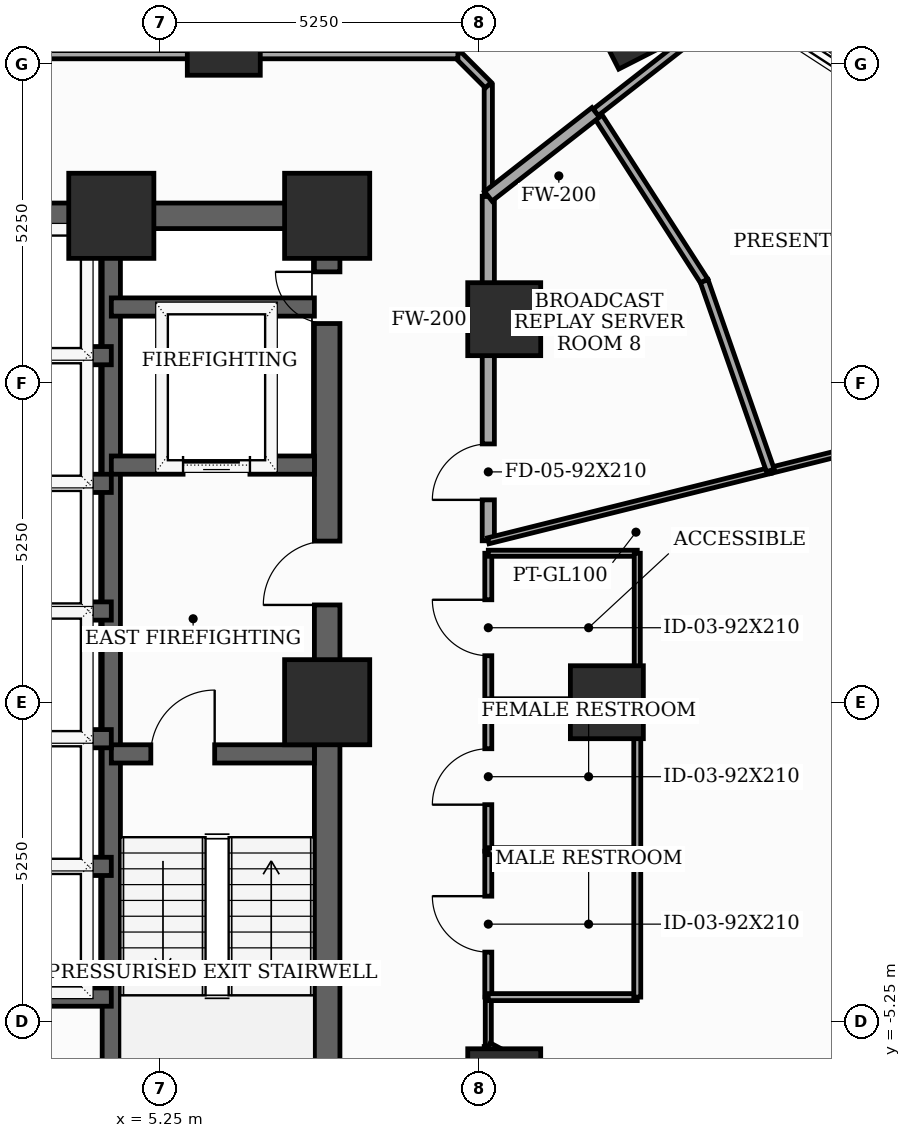
"""IFC4 building model, lengths in metres.
Left out: names, types, materials, properties, quantities, classifications, styles, units other than length and angle.
Written with IfcOpenShell. Run it as: python <this file> out.ifc"""

import sys

from ifc_helpers import new_model, si_unit, direction, frame, frame_2d, origin, origin_2d, place, context, subcontext, project, spatial, rectangle, extrude, element, fill, save


model = new_model("IFC4")
c1 = context("Model", 3, precision=1e-05, world=origin(), true_north=direction((0.0, 1.0)))
c2 = subcontext(c1, "Body", "Model", "MODEL_VIEW")
j1 = project(units=[si_unit("LENGTHUNIT", "METRE"), si_unit("PLANEANGLEUNIT", "RADIAN")], contexts=[c1])
p1 = place(None, origin())
s1 = spatial("IfcSite", under=j1, at=p1, CompositionType="ELEMENT")
p2 = place(p1, origin())
s2 = spatial("IfcBuilding", under=s1, at=p2, CompositionType="ELEMENT")
p3 = place(p2, frame((0.0, 0.0, 127.3)))
s3 = spatial("IfcBuildingStorey", under=s2, at=p3, CompositionType="ELEMENT", Elevation=127.3)
for number, where, z_axis, x_axis in (
    (1, (8.0, 0.0, 0.0), (0.0, 0.0, 1.0), (1.0, 0.0, 0.0)),
    (2, (8.0, 8.0, 0.0), (0.0, 0.0, 1.0), (1.0, 0.0, 0.0)),
    (3, (4.45, 8.0, 0.0), (0.0, 0.0, 1.0), (1.0, 0.0, 0.0)),
):
    element("IfcColumn", number, at=place(p3, frame(where, z_axis=z_axis, x_axis=x_axis)), inside=s3, PredefinedType="COLUMN", context=c2, shape_type="SweptSolid", body=[
        extrude(rectangle(XDim=1.4, YDim=1.4, at=origin_2d()), origin(), (0.0, 0.0, 1.0), 3.7),
    ])
for number, where, z_axis, x_axis in (
    (4, (12.6, 0.0, 0.0), (0.0, 0.0, 1.0), (1.0, 0.0, 0.0)),
    (5, (10.912, 6.3, 0.0), (0.0, 0.0, 1.0), (1.0, 0.0, 0.0)),
    (6, (6.3, 10.912, 0.0), (0.0, 0.0, 1.0), (1.0, 0.0, 0.0)),
    (7, (10.912, -6.3, 0.0), (0.0, 0.0, 1.0), (1.0, 0.0, 0.0)),
    (8, (13.058, 11.22, 0.0), (0.0, 0.0, 1.0), (0.891, 0.454, 0.0)),
):
    element("IfcColumn", number, at=place(p3, frame(where, z_axis=z_axis, x_axis=x_axis)), inside=s3, PredefinedType="COLUMN", context=c2, shape_type="SweptSolid", body=[
        extrude(rectangle(XDim=1.2, YDim=1.2, at=origin_2d()), origin(), (0.0, 0.0, 1.0), 3.7),
    ])
p4 = place(p3, frame((8.0, -8.0, 0.0), z_axis=(0.0, 0.0, 1.0), x_axis=(0.0, 1.0, 0.0)))
e9 = element("IfcWall", 9, at=p4, inside=s3, PredefinedType="SHEAR", context=c2, shape_type="SweptSolid", body=[
    extrude(rectangle(XDim=16.0, YDim=0.42, at=frame_2d((8.0, 0.0))), origin(), (0.0, 0.0, 1.0), 3.5),
])
p5 = place(p4, frame((9.6, 0.0, 0.0)))
e10 = element("IfcOpeningElement", 10, at=p5, cuts=e9, PredefinedType="OPENING", context=c2, shape_type="SweptSolid", body=[
    extrude(rectangle(XDim=1.05, YDim=2.15, at=frame_2d((0.525, 1.075))), frame((0.0, 0.22, 0.0), z_axis=(0.0, -1.0, 0.0), x_axis=(1.0, 0.0, 0.0)), (0.0, 0.0, 1.0), 0.44),
])
p6 = place(p4, frame((14.229, 0.0, 0.0)))
e11 = element("IfcOpeningElement", 11, at=p6, cuts=e9, PredefinedType="OPENING", context=c2, shape_type="SweptSolid", body=[
    extrude(rectangle(XDim=0.85, YDim=2.02, at=frame_2d((0.425, 1.01))), frame((0.0, 0.22, 0.0), z_axis=(0.0, -1.0, 0.0), x_axis=(1.0, 0.0, 0.0)), (0.0, 0.0, 1.0), 0.44),
])
p7 = place(p3, frame((-8.0, 8.0, 0.0), z_axis=(0.0, 0.0, 1.0), x_axis=(1.0, 0.0, 0.0)))
e12 = element("IfcWall", 12, at=p7, inside=s3, PredefinedType="SHEAR", context=c2, shape_type="SweptSolid", body=[
    extrude(rectangle(XDim=16.0, YDim=0.42, at=frame_2d((8.0, 0.0))), origin(), (0.0, 0.0, 1.0), 3.5),
])
p8 = place(p7, frame((7.1, 0.0, 0.0)))
e13 = element("IfcOpeningElement", 13, at=p8, cuts=e12, PredefinedType="OPENING", context=c2, shape_type="SweptSolid", body=[
    extrude(rectangle(XDim=1.8, YDim=2.15, at=frame_2d((0.9, 1.075))), frame((0.0, 0.22, 0.0), z_axis=(0.0, -1.0, 0.0), x_axis=(1.0, 0.0, 0.0)), (0.0, 0.0, 1.0), 0.44),
])
p9 = place(p3, frame((4.45, -7.79, 0.0), z_axis=(0.0, 0.0, 1.0), x_axis=(0.0, 1.0, 0.0)))
e14 = element("IfcWall", 14, at=p9, inside=s3, PredefinedType="SHEAR", context=c2, shape_type="SweptSolid", body=[
    extrude(rectangle(XDim=15.58, YDim=0.3, at=frame_2d((7.79, 0.0))), origin(), (0.0, 0.0, 1.0), 3.5),
])
p10 = place(p3, frame((4.45, -0.85, 0.0), z_axis=(0.0, 0.0, 1.0), x_axis=(1.0, 0.0, 0.0)))
e15 = element("IfcWall", 15, at=p10, inside=s3, PredefinedType="SHEAR", context=c2, shape_type="SweptSolid", body=[
    extrude(rectangle(XDim=3.34, YDim=0.3, at=frame_2d((1.67, 0.0))), origin(), (0.0, 0.0, 1.0), 3.5),
])
p11 = place(p10, frame((0.65, 0.0, 0.0)))
e16 = element("IfcOpeningElement", 16, at=p11, cuts=e15, PredefinedType="OPENING", context=c2, shape_type="SweptSolid", body=[
    extrude(rectangle(XDim=1.05, YDim=2.15, at=frame_2d((0.525, 1.075))), frame((0.0, 0.16, 0.0), z_axis=(0.0, -1.0, 0.0), x_axis=(1.0, 0.0, 0.0)), (0.0, 0.0, 1.0), 0.32),
])
p12 = place(p3, frame((4.45, 3.9, 0.0), z_axis=(0.0, 0.0, 1.0), x_axis=(1.0, 0.0, 0.0)))
e17 = element("IfcWall", 17, at=p12, inside=s3, PredefinedType="SHEAR", context=c2, shape_type="SweptSolid", body=[
    extrude(rectangle(XDim=3.34, YDim=0.3, at=frame_2d((1.67, 0.0))), origin(), (0.0, 0.0, 1.0), 3.5),
])
p13 = place(p12, frame((1.18, 0.0, 0.0)))
e18 = element("IfcOpeningElement", 18, at=p13, cuts=e17, PredefinedType="OPENING", context=c2, shape_type="SweptSolid", body=[
    extrude(rectangle(XDim=1.1, YDim=2.1, at=frame_2d((0.55, 1.05))), frame((0.0, 0.16, 0.0), z_axis=(0.0, -1.0, 0.0), x_axis=(1.0, 0.0, 0.0)), (0.0, 0.0, 1.0), 0.32),
])
p14 = place(p3, frame((4.45, 6.5, 0.0), z_axis=(0.0, 0.0, 1.0), x_axis=(1.0, 0.0, 0.0)))
e19 = element("IfcWall", 19, at=p14, inside=s3, PredefinedType="SHEAR", context=c2, shape_type="SweptSolid", body=[
    extrude(rectangle(XDim=3.34, YDim=0.3, at=frame_2d((1.67, 0.0))), origin(), (0.0, 0.0, 1.0), 3.5),
])
p15 = place(p3, frame((-4.45, -4.85, 0.0), z_axis=(0.0, 0.0, 1.0), x_axis=(1.0, 0.0, 0.0)))
e20 = element("IfcWall", 20, at=p15, inside=s3, PredefinedType="SHEAR", context=c2, shape_type="SweptSolid", body=[
    extrude(rectangle(XDim=8.9, YDim=0.3, at=frame_2d((4.45, 0.0))), origin(), (0.0, 0.0, 1.0), 3.5),
])
for number, where, z_axis, x_axis in (
    (21, (1.68, 1.5, 0.0), (0.0, 0.0, 1.0), (1.0, 0.0, 0.0)),
    (22, (1.68, 3.6, 0.0), (0.0, 0.0, 1.0), (1.0, 0.0, 0.0)),
    (23, (1.68, 5.7, 0.0), (0.0, 0.0, 1.0), (1.0, 0.0, 0.0)),
    (24, (1.68, -2.7, 0.0), (0.0, 0.0, 1.0), (1.0, 0.0, 0.0)),
    (25, (1.68, -0.6, 0.0), (0.0, 0.0, 1.0), (1.0, 0.0, 0.0)),
):
    element("IfcWall", number, at=place(p3, frame(where, z_axis=z_axis, x_axis=x_axis)), inside=s3, PredefinedType="SHEAR", context=c2, shape_type="SweptSolid", body=[
        extrude(rectangle(XDim=2.77, YDim=0.3, at=frame_2d((1.385, 0.0))), origin(), (0.0, 0.0, 1.0), 3.5),
    ])
p16 = place(p3, frame((10.65, -10.15, 0.0), z_axis=(0.0, 0.0, 1.0), x_axis=(0.0, 1.0, 0.0)))
e26 = element("IfcWall", 26, at=p16, inside=s3, PredefinedType="PARTITIONING", context=c2, shape_type="SweptSolid", body=[
    extrude(rectangle(XDim=4.487, YDim=0.135, at=frame_2d((2.243, 0.0))), origin(), (0.0, 0.0, 1.0), 2.785),
])
p17 = place(p16, frame((0.781, 0.0, 0.0)))
e27 = element("IfcOpeningElement", 27, at=p17, cuts=e26, PredefinedType="OPENING", context=c2, shape_type="SweptSolid", body=[
    extrude(rectangle(XDim=0.95, YDim=2.1, at=frame_2d((0.475, 1.05))), frame((0.0, 0.077, 0.0), z_axis=(0.0, -1.0, 0.0), x_axis=(1.0, 0.0, 0.0)), (0.0, 0.0, 1.0), 0.155),
])
p18 = place(p3, frame((10.65, -4.85, 0.0), z_axis=(0.0, 0.0, 1.0), x_axis=(0.0, 1.0, 0.0)))
e28 = element("IfcWall", 28, at=p18, inside=s3, PredefinedType="PARTITIONING", context=c2, shape_type="SweptSolid", body=[
    extrude(rectangle(XDim=2.4, YDim=0.115, at=frame_2d((1.2, 0.0))), origin(), (0.0, 0.0, 1.0), 3.5),
])
p19 = place(p18, frame((0.74, 0.0, 0.0)))
e29 = element("IfcOpeningElement", 29, at=p19, cuts=e28, PredefinedType="OPENING", context=c2, shape_type="SweptSolid", body=[
    extrude(rectangle(XDim=0.92, YDim=2.1, at=frame_2d((0.46, 1.05))), frame((0.0, 0.067, 0.0), z_axis=(0.0, -1.0, 0.0), x_axis=(1.0, 0.0, 0.0)), (0.0, 0.0, 1.0), 0.135),
])
p20 = place(p3, frame((10.65, -2.45, 0.0), z_axis=(0.0, 0.0, 1.0), x_axis=(0.0, 1.0, 0.0)))
e30 = element("IfcWall", 30, at=p20, inside=s3, PredefinedType="PARTITIONING", context=c2, shape_type="SweptSolid", body=[
    extrude(rectangle(XDim=2.45, YDim=0.115, at=frame_2d((1.225, 0.0))), origin(), (0.0, 0.0, 1.0), 2.785),
])
p21 = place(p20, frame((0.765, 0.0, 0.0)))
e31 = element("IfcOpeningElement", 31, at=p21, cuts=e30, PredefinedType="OPENING", context=c2, shape_type="SweptSolid", body=[
    extrude(rectangle(XDim=0.92, YDim=2.1, at=frame_2d((0.46, 1.05))), frame((0.0, 0.067, 0.0), z_axis=(0.0, -1.0, 0.0), x_axis=(1.0, 0.0, 0.0)), (0.0, 0.0, 1.0), 0.135),
])
p22 = place(p3, frame((10.65, -5.663, 0.0), z_axis=(0.0, 0.0, 1.0), x_axis=(0.0, 1.0, 0.0)))
e32 = element("IfcWall", 32, at=p22, inside=s3, PredefinedType="MOVABLE", context=c2, shape_type="SweptSolid", body=[
    extrude(rectangle(XDim=0.813, YDim=0.1, at=frame_2d((0.406, 0.0))), origin(), (0.0, 0.0, 1.0), 3.5),
])
p23 = place(p3, frame((10.65, 0.0, 0.0), z_axis=(0.0, 0.0, 1.0), x_axis=(0.0, 1.0, 0.0)))
e33 = element("IfcWall", 33, at=p23, inside=s3, PredefinedType="PARTITIONING", context=c2, shape_type="SweptSolid", body=[
    extrude(rectangle(XDim=2.45, YDim=0.115, at=frame_2d((1.225, 0.0))), origin(), (0.0, 0.0, 1.0), 2.785),
])
p24 = place(p23, frame((0.765, 0.0, 0.0)))
e34 = element("IfcOpeningElement", 34, at=p24, cuts=e33, PredefinedType="OPENING", context=c2, shape_type="SweptSolid", body=[
    extrude(rectangle(XDim=0.92, YDim=2.1, at=frame_2d((0.46, 1.05))), frame((0.0, 0.067, 0.0), z_axis=(0.0, -1.0, 0.0), x_axis=(1.0, 0.0, 0.0)), (0.0, 0.0, 1.0), 0.135),
])
p25 = place(p3, frame((10.65, 2.655, 0.0), z_axis=(0.0, 0.0, 1.0), x_axis=(0.0, 1.0, 0.0)))
e35 = element("IfcWall", 35, at=p25, inside=s3, PredefinedType="SOLIDWALL", context=c2, shape_type="SweptSolid", body=[
    extrude(rectangle(XDim=5.666, YDim=0.2, at=frame_2d((2.833, 0.0))), origin(), (0.0, 0.0, 1.0), 2.785),
])
p26 = place(p25, frame((0.673, 0.0, 0.0)))
e36 = element("IfcOpeningElement", 36, at=p26, cuts=e35, PredefinedType="OPENING", context=c2, shape_type="SweptSolid", body=[
    extrude(rectangle(XDim=0.92, YDim=2.1, at=frame_2d((0.46, 1.05))), frame((0.0, 0.11, 0.0), z_axis=(0.0, -1.0, 0.0), x_axis=(1.0, 0.0, 0.0)), (0.0, 0.0, 1.0), 0.22),
])
p27 = place(p3, frame((10.65, 8.321, 0.0), z_axis=(0.0, 0.0, 1.0), x_axis=(0.0, 1.0, 0.0)))
e37 = element("IfcWall", 37, at=p27, inside=s3, PredefinedType="PARTITIONING", context=c2, shape_type="SweptSolid", body=[
    extrude(rectangle(XDim=1.829, YDim=0.135, at=frame_2d((0.915, 0.0))), origin(), (0.0, 0.0, 1.0), 3.125),
])
p28 = place(p3, frame((10.65, 10.15, 0.0), z_axis=(0.0, 0.0, 1.0), x_axis=(-0.707106781187, 0.707106781187, 0.0)))
e38 = element("IfcWall", 38, at=p28, inside=s3, PredefinedType="PARTITIONING", context=c2, shape_type="SweptSolid", body=[
    extrude(rectangle(XDim=0.707, YDim=0.135, at=frame_2d((0.354, 0.0))), origin(), (0.0, 0.0, 1.0), 3.125),
])
p29 = place(p3, frame((10.15, 10.65, 0.0), z_axis=(0.0, 0.0, 1.0), x_axis=(-1.0, 0.0, 0.0)))
e39 = element("IfcWall", 39, at=p29, inside=s3, PredefinedType="PARTITIONING", context=c2, shape_type="SweptSolid", body=[
    extrude(rectangle(XDim=12.414, YDim=0.135, at=frame_2d((6.207, 0.0))), origin(), (0.0, 0.0, 1.0), 2.785),
])
p30 = place(p29, frame((7.222, 0.0, 0.0)))
e40 = element("IfcOpeningElement", 40, at=p30, cuts=e39, PredefinedType="OPENING", context=c2, shape_type="SweptSolid", body=[
    extrude(rectangle(XDim=0.95, YDim=2.1, at=frame_2d((0.475, 1.05))), frame((0.0, 0.077, 0.0), z_axis=(0.0, -1.0, 0.0), x_axis=(1.0, 0.0, 0.0)), (0.0, 0.0, 1.0), 0.155),
])
p31 = place(p3, frame((14.137, -7.517, 0.0), z_axis=(0.0, 0.0, 1.0), x_axis=(-0.882957991608, 0.46945200506, 0.0)))
e41 = element("IfcWall", 41, at=p31, inside=s3, PredefinedType="PARTITIONING", context=c2, shape_type="SweptSolid", body=[
    extrude(rectangle(XDim=3.949, YDim=0.135, at=frame_2d((1.975, 0.0))), origin(), (0.0, 0.0, 1.0), 2.785),
])
p32 = place(p31, frame((0.33, 0.0, 0.0)))
e42 = element("IfcOpeningElement", 42, at=p32, cuts=e41, PredefinedType="OPENING", context=c2, shape_type="SweptSolid", body=[
    extrude(rectangle(XDim=0.92, YDim=2.1, at=frame_2d((0.46, 1.05))), frame((0.0, 0.077, 0.0), z_axis=(0.0, -1.0, 0.0), x_axis=(1.0, 0.0, 0.0)), (0.0, 0.0, 1.0), 0.155),
])
for number, where, z_axis, x_axis in (
    (43, (13.1, -2.45, 0.0), (0.0, 0.0, 1.0), (-1.0, 0.0, 0.0)),
    (44, (10.65, -4.85, 0.0), (0.0, 0.0, 1.0), (1.0, 0.0, 0.0)),
):
    element("IfcWall", number, at=place(p3, frame(where, z_axis=z_axis, x_axis=x_axis)), inside=s3, PredefinedType="PARTITIONING", context=c2, shape_type="SweptSolid", body=[
        extrude(rectangle(XDim=2.45, YDim=0.115, at=frame_2d((1.225, 0.0))), origin(), (0.0, 0.0, 1.0), 2.785),
    ])
p33 = place(p3, frame((13.1, -4.85, 0.0), z_axis=(0.0, 0.0, 1.0), x_axis=(0.0, 1.0, 0.0)))
e45 = element("IfcWall", 45, at=p33, inside=s3, PredefinedType="PARTITIONING", context=c2, shape_type="SweptSolid", body=[
    extrude(rectangle(XDim=2.4, YDim=0.115, at=frame_2d((1.2, 0.0))), origin(), (0.0, 0.0, 1.0), 3.5),
])
p34 = place(p3, frame((13.1, -2.45, 0.0), z_axis=(0.0, 0.0, 1.0), x_axis=(0.0, 1.0, 0.0)))
e46 = element("IfcWall", 46, at=p34, inside=s3, PredefinedType="PARTITIONING", context=c2, shape_type="SweptSolid", body=[
    extrude(rectangle(XDim=2.45, YDim=0.115, at=frame_2d((1.225, 0.0))), origin(), (0.0, 0.0, 1.0), 3.5),
])
p35 = place(p3, frame((13.1, 0.0, 0.0), z_axis=(0.0, 0.0, 1.0), x_axis=(-1.0, 0.0, 0.0)))
e47 = element("IfcWall", 47, at=p35, inside=s3, PredefinedType="PARTITIONING", context=c2, shape_type="SweptSolid", body=[
    extrude(rectangle(XDim=2.45, YDim=0.115, at=frame_2d((1.225, 0.0))), origin(), (0.0, 0.0, 1.0), 2.785),
])
p36 = place(p3, frame((10.65, 2.45, 0.0), z_axis=(0.0, 0.0, 1.0), x_axis=(1.0, 0.0, 0.0)))
e48 = element("IfcWall", 48, at=p36, inside=s3, PredefinedType="MOVABLE", context=c2, shape_type="SweptSolid", body=[
    extrude(rectangle(XDim=2.45, YDim=0.1, at=frame_2d((1.225, 0.0))), origin(), (0.0, 0.0, 1.0), 2.785),
])
p37 = place(p3, frame((13.1, 2.45, 0.0), z_axis=(0.0, 0.0, 1.0), x_axis=(0.0, -1.0, 0.0)))
e49 = element("IfcWall", 49, at=p37, inside=s3, PredefinedType="MOVABLE", context=c2, shape_type="SweptSolid", body=[
    extrude(rectangle(XDim=2.45, YDim=0.1, at=frame_2d((1.225, 0.0))), origin(), (0.0, 0.0, 1.0), 3.5),
])
p38 = place(p3, frame((23.472, 5.852, 0.0), z_axis=(0.0, 0.0, 1.0), x_axis=(-0.970293868859, -0.24192934517, 0.0)))
e50 = element("IfcWall", 50, at=p38, inside=s3, PredefinedType="MOVABLE", context=c2, shape_type="SweptSolid", body=[
    extrude(rectangle(XDim=8.433, YDim=0.1, at=frame_2d((4.217, 0.0))), origin(), (0.0, 0.0, 1.0), 2.985),
])
p39 = place(p38, frame((4.769, 0.0, 0.0)))
e51 = element("IfcOpeningElement", 51, at=p39, cuts=e50, PredefinedType="OPENING", context=c2, shape_type="SweptSolid", body=[
    extrude(rectangle(XDim=0.92, YDim=2.1, at=frame_2d((0.46, 1.05))), frame((0.0, 0.06, 0.0), z_axis=(0.0, -1.0, 0.0), x_axis=(1.0, 0.0, 0.0)), (0.0, 0.0, 1.0), 0.12),
])
p40 = place(p3, frame((15.289, 3.812, 0.0), z_axis=(0.0, 0.0, 1.0), x_axis=(-0.970280510542, -0.241982914402, 0.0)))
e52 = element("IfcWall", 52, at=p40, inside=s3, PredefinedType="MOVABLE", context=c2, shape_type="SweptSolid", body=[
    extrude(rectangle(XDim=4.781, YDim=0.1, at=frame_2d((2.391, 0.0))), origin(), (0.0, 0.0, 1.0), 2.785),
])
p41 = place(p3, frame((12.416, 9.701, 0.0), z_axis=(0.0, 0.0, 1.0), x_axis=(0.540981963117, -0.841034194062, 0.0)))
e53 = element("IfcWall", 53, at=p41, inside=s3, PredefinedType="PARTITIONING", context=c2, shape_type="SweptSolid", body=[
    extrude(rectangle(XDim=3.299, YDim=0.135, at=frame_2d((1.65, 0.0))), origin(), (0.0, 0.0, 1.0), 2.885),
])
p42 = place(p3, frame((14.201, 6.926, 0.0), z_axis=(0.0, 0.0, 1.0), x_axis=(0.329872352593, -0.944025545732, 0.0)))
e54 = element("IfcWall", 54, at=p42, inside=s3, PredefinedType="PARTITIONING", context=c2, shape_type="SweptSolid", body=[
    extrude(rectangle(XDim=3.299, YDim=0.135, at=frame_2d((1.649, 0.0))), origin(), (0.0, 0.0, 1.0), 2.885),
])
p43 = place(p3, frame((14.744, 11.52, 0.0), z_axis=(0.0, 0.0, 1.0), x_axis=(-0.788015604839, -0.615655265981, 0.0)))
e55 = element("IfcWall", 55, at=p43, inside=s3, PredefinedType="PARTITIONING", context=c2, shape_type="SweptSolid", body=[
    extrude(rectangle(XDim=2.955, YDim=0.135, at=frame_2d((1.478, 0.0))), origin(), (0.0, 0.0, 1.0), 2.885),
])
p44 = place(p3, frame((12.416, 9.701, 0.0), z_axis=(0.0, 0.0, 1.0), x_axis=(-0.788001252745, -0.615673635681, 0.0)))
e56 = element("IfcWall", 56, at=p44, inside=s3, PredefinedType="SOLIDWALL", context=c2, shape_type="SweptSolid", body=[
    extrude(rectangle(XDim=2.241, YDim=0.2, at=frame_2d((1.121, 0.0))), origin(), (0.0, 0.0, 1.0), 2.885),
])
p45 = place(p5, origin())
e57 = element("IfcDoor", 57, at=p45, inside=s3, OperationType="SINGLE_SWING_LEFT", PredefinedType="DOOR", context=c2, shape_type="SweptSolid", body=[
    extrude(rectangle(XDim=1.05, YDim=2.15, at=frame_2d((0.525, 1.075))), frame((0.0, 0.025, 0.0), z_axis=(0.0, -1.0, 0.0), x_axis=(1.0, 0.0, 0.0)), (0.0, 0.0, 1.0), 0.05),
])
fill(e10, e57)
p46 = place(p6, origin())
e58 = element("IfcDoor", 58, at=p46, inside=s3, OperationType="SINGLE_SWING_RIGHT", PredefinedType="TRAPDOOR", context=c2, shape_type="SweptSolid", body=[
    extrude(rectangle(XDim=0.85, YDim=2.02, at=frame_2d((0.425, 1.01))), frame((0.0, 0.025, 0.0), z_axis=(0.0, -1.0, 0.0), x_axis=(1.0, 0.0, 0.0)), (0.0, 0.0, 1.0), 0.05),
])
fill(e11, e58)
p47 = place(p11, origin())
e59 = element("IfcDoor", 59, at=p47, inside=s3, OperationType="SINGLE_SWING_RIGHT", PredefinedType="DOOR", context=c2, shape_type="SweptSolid", body=[
    extrude(rectangle(XDim=1.05, YDim=2.15, at=frame_2d((0.525, 1.075))), frame((0.0, 0.025, 0.0), z_axis=(0.0, -1.0, 0.0), x_axis=(1.0, 0.0, 0.0)), (0.0, 0.0, 1.0), 0.05),
])
fill(e16, e59)
p48 = place(p13, origin())
e60 = element("IfcDoor", 60, at=p48, inside=s3, OperationType="SLIDING_TO_LEFT", PredefinedType="DOOR", context=c2, shape_type="SweptSolid", body=[
    extrude(rectangle(XDim=1.1, YDim=2.1, at=frame_2d((0.55, 1.05))), frame((0.0, 0.025, 0.0), z_axis=(0.0, -1.0, 0.0), x_axis=(1.0, 0.0, 0.0)), (0.0, 0.0, 1.0), 0.05),
])
fill(e18, e60)
p49 = place(p19, origin())
e61 = element("IfcDoor", 61, at=p49, inside=s3, OperationType="SINGLE_SWING_RIGHT", PredefinedType="DOOR", context=c2, shape_type="SweptSolid", body=[
    extrude(rectangle(XDim=0.92, YDim=2.1, at=frame_2d((0.46, 1.05))), frame((0.0, 0.025, 0.0), z_axis=(0.0, -1.0, 0.0), x_axis=(1.0, 0.0, 0.0)), (0.0, 0.0, 1.0), 0.05),
])
fill(e29, e61)
p50 = place(p21, origin())
e62 = element("IfcDoor", 62, at=p50, inside=s3, OperationType="SINGLE_SWING_LEFT", PredefinedType="DOOR", context=c2, shape_type="SweptSolid", body=[
    extrude(rectangle(XDim=0.92, YDim=2.1, at=frame_2d((0.46, 1.05))), frame((0.0, 0.025, 0.0), z_axis=(0.0, -1.0, 0.0), x_axis=(1.0, 0.0, 0.0)), (0.0, 0.0, 1.0), 0.05),
])
fill(e31, e62)
p51 = place(p24, origin())
e63 = element("IfcDoor", 63, at=p51, inside=s3, OperationType="SINGLE_SWING_RIGHT", PredefinedType="DOOR", context=c2, shape_type="SweptSolid", body=[
    extrude(rectangle(XDim=0.92, YDim=2.1, at=frame_2d((0.46, 1.05))), frame((0.0, 0.025, 0.0), z_axis=(0.0, -1.0, 0.0), x_axis=(1.0, 0.0, 0.0)), (0.0, 0.0, 1.0), 0.05),
])
fill(e34, e63)
p52 = place(p26, origin())
e64 = element("IfcDoor", 64, at=p52, inside=s3, OperationType="SINGLE_SWING_LEFT", PredefinedType="DOOR", context=c2, shape_type="SweptSolid", body=[
    extrude(rectangle(XDim=0.92, YDim=2.1, at=frame_2d((0.46, 1.05))), frame((0.0, 0.025, 0.0), z_axis=(0.0, -1.0, 0.0), x_axis=(1.0, 0.0, 0.0)), (0.0, 0.0, 1.0), 0.05),
])
fill(e36, e64)
save(model, sys.argv[1])
